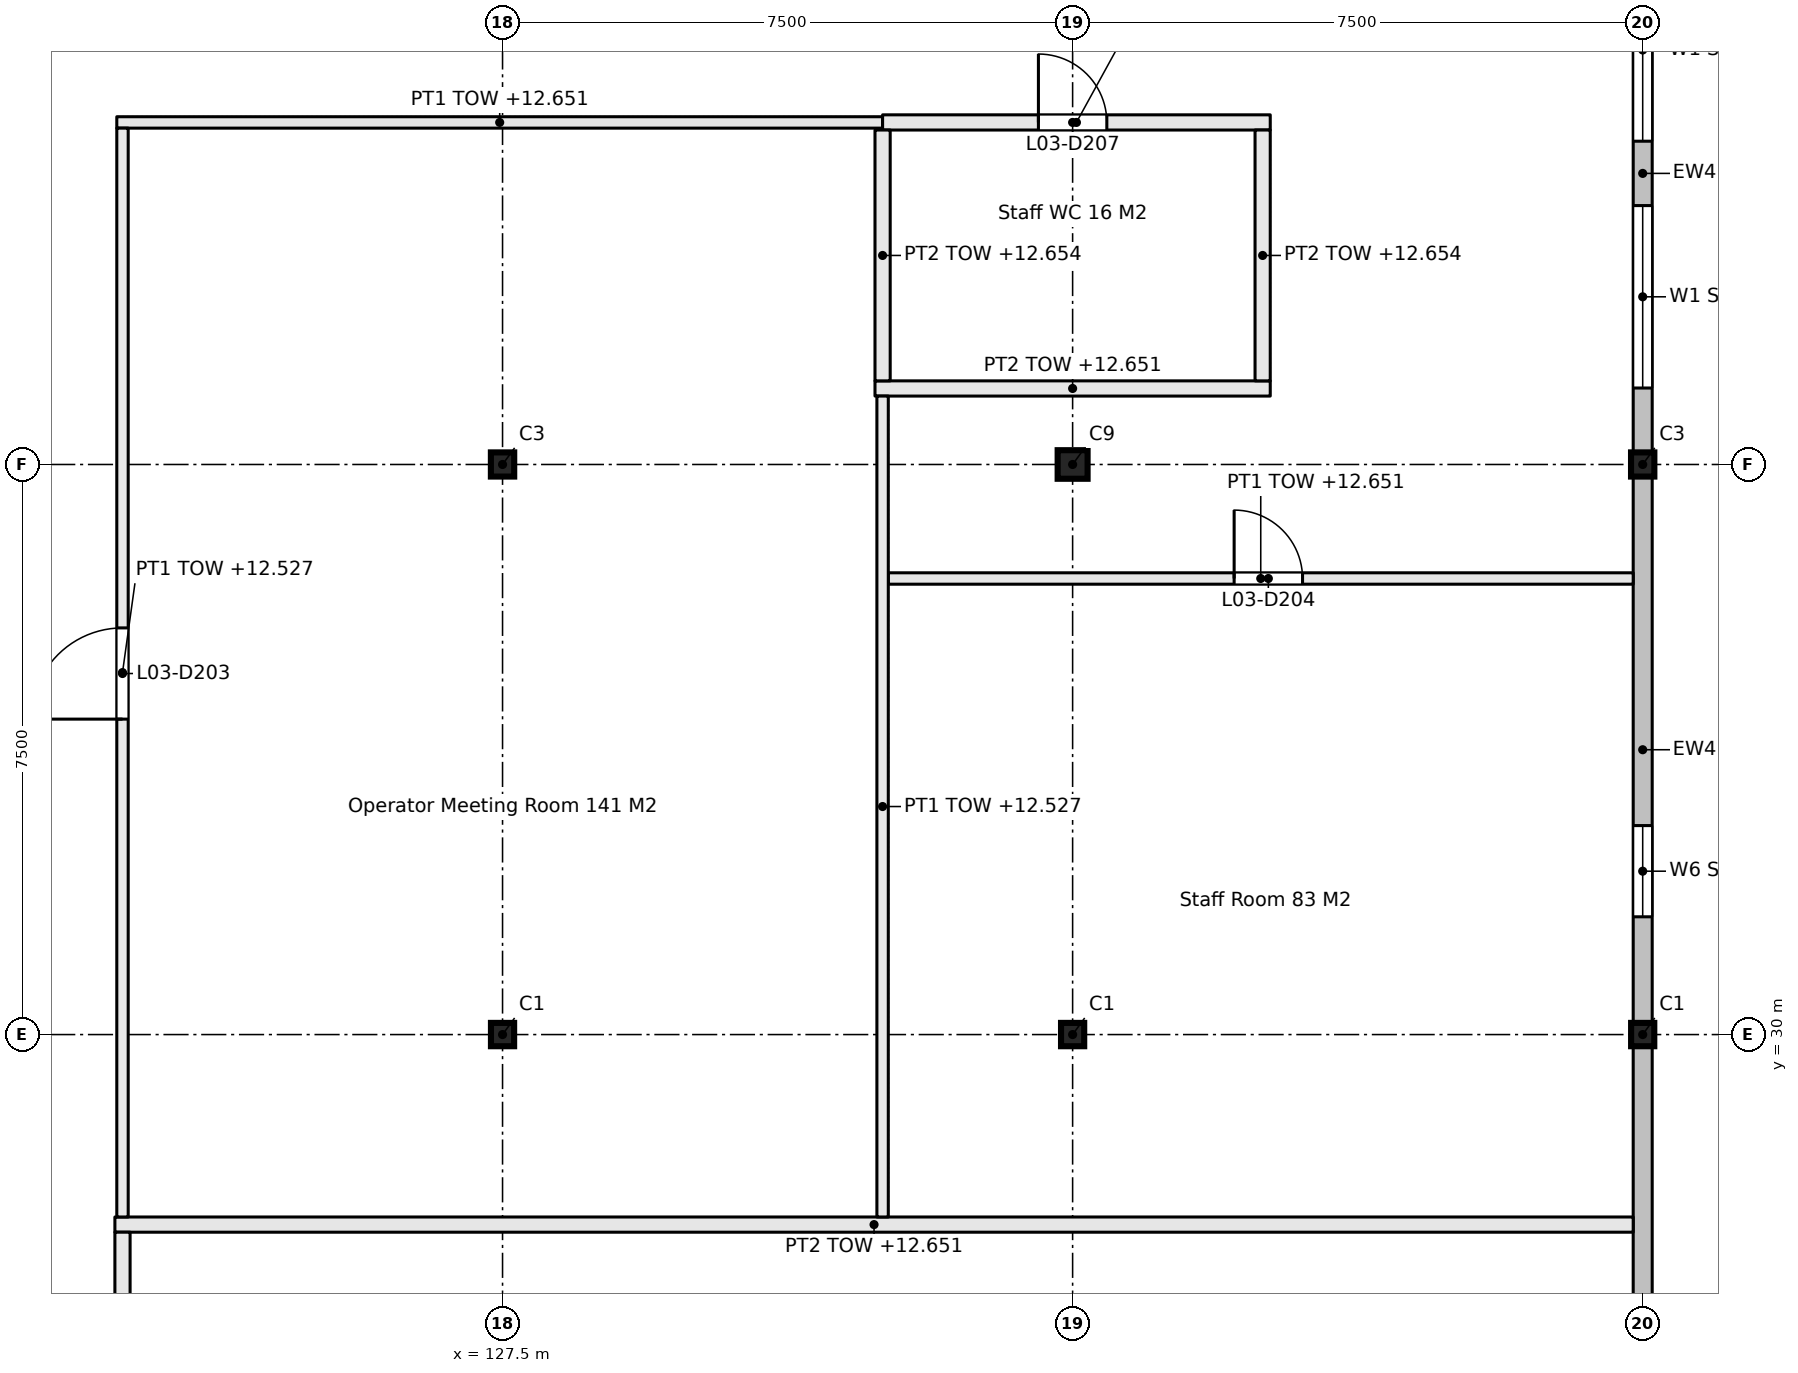
"""IFC4 building model, lengths in metres.
Left out: names, types, materials, properties, quantities, classifications, styles, units other than length and angle.
Written with IfcOpenShell. Run it as: python <this file> out.ifc"""

import sys

from ifc_helpers import new_model, si_unit, direction, frame, frame_2d, origin, origin_2d, place, context, subcontext, project, spatial, rectangle, i_section, extrude, element, fill, save


model = new_model("IFC4")
c1 = context("Model", 3, precision=1e-05, world=origin(), true_north=direction((0.0, 1.0)))
c2 = subcontext(c1, "Body", "Model", "MODEL_VIEW")
j1 = project(units=[si_unit("LENGTHUNIT", "METRE"), si_unit("PLANEANGLEUNIT", "RADIAN")], contexts=[c1])
p1 = place(None, origin())
s1 = spatial("IfcSite", under=j1, at=p1, CompositionType="ELEMENT")
p2 = place(p1, origin())
s2 = spatial("IfcBuilding", under=s1, at=p2, CompositionType="ELEMENT")
p3 = place(p2, frame((0.0, 0.0, 9.9)))
s3 = spatial("IfcBuildingStorey", under=s2, at=p3, CompositionType="ELEMENT", Elevation=9.9)
p4 = place(p3, frame((127.5, 30.0, 0.0), z_axis=(0.0, 0.0, 1.0), x_axis=(1.0, 0.0, 0.0)))
e1 = element("IfcColumn", 1, at=p4, inside=s3, PredefinedType="COLUMN", context=c2, shape_type="SweptSolid", body=[
    extrude(i_section(OverallWidth=0.305, OverallDepth=0.307, WebThickness=0.01, FlangeThickness=0.015, FilletRadius=0.015, at=origin_2d()), origin(), (0.0, 0.0, 1.0), 3.3),
])
p5 = place(p3, frame((127.5, 37.5, 0.0), z_axis=(0.0, 0.0, 1.0), x_axis=(1.0, 0.0, 0.0)))
e2 = element("IfcColumn", 2, at=p5, inside=s3, PredefinedType="COLUMN", context=c2, shape_type="SweptSolid", body=[
    extrude(i_section(OverallWidth=0.307, OverallDepth=0.318, WebThickness=0.013, FlangeThickness=0.021, FilletRadius=0.015, at=origin_2d()), origin(), (0.0, 0.0, 1.0), 3.3),
])
p6 = place(p3, frame((135.0, 30.0, 0.0), z_axis=(0.0, 0.0, 1.0), x_axis=(1.0, 0.0, 0.0)))
e3 = element("IfcColumn", 3, at=p6, inside=s3, PredefinedType="COLUMN", context=c2, shape_type="SweptSolid", body=[
    extrude(i_section(OverallWidth=0.305, OverallDepth=0.307, WebThickness=0.01, FlangeThickness=0.015, FilletRadius=0.015, at=origin_2d()), origin(), (0.0, 0.0, 1.0), 3.3),
])
p7 = place(p3, frame((135.0, 37.5, 0.0), z_axis=(0.0, 0.0, 1.0), x_axis=(1.0, 0.0, 0.0)))
e4 = element("IfcColumn", 4, at=p7, inside=s3, PredefinedType="COLUMN", context=c2, shape_type="SweptSolid", body=[
    extrude(i_section(OverallWidth=0.394, OverallDepth=0.376, WebThickness=0.017, FlangeThickness=0.028, FilletRadius=0.015, at=origin_2d()), origin(), (0.0, 0.0, 1.0), 3.3),
])
p8 = place(p3, frame((142.5, 30.0, 0.0), z_axis=(0.0, 0.0, 1.0), x_axis=(1.0, 0.0, 0.0)))
e5 = element("IfcColumn", 5, at=p8, inside=s3, PredefinedType="COLUMN", context=c2, shape_type="SweptSolid", body=[
    extrude(i_section(OverallWidth=0.305, OverallDepth=0.307, WebThickness=0.01, FlangeThickness=0.015, FilletRadius=0.015, at=origin_2d()), origin(), (0.0, 0.0, 1.0), 3.3),
])
p9 = place(p3, frame((142.5, 37.5, 0.0), z_axis=(0.0, 0.0, 1.0), x_axis=(1.0, 0.0, 0.0)))
e6 = element("IfcColumn", 6, at=p9, inside=s3, PredefinedType="COLUMN", context=c2, shape_type="SweptSolid", body=[
    extrude(i_section(OverallWidth=0.307, OverallDepth=0.318, WebThickness=0.013, FlangeThickness=0.021, FilletRadius=0.015, at=origin_2d()), origin(), (0.0, 0.0, 1.0), 3.3),
])
p10 = place(p3, frame((122.4, 27.5, 0.0), z_axis=(0.0, 0.0, 1.0), x_axis=(1.0, 0.0, 0.0)))
e7 = element("IfcWall", 7, at=p10, inside=s3, PredefinedType="PARTITIONING", context=c2, shape_type="SweptSolid", body=[
    extrude(rectangle(XDim=19.975, YDim=0.2, at=frame_2d((9.988, 0.0))), origin(), (0.0, 0.0, 1.0), 2.751),
])
p11 = place(p3, frame((132.575, 36.0, 0.0), z_axis=(0.0, 0.0, 1.0), x_axis=(1.0, 0.0, 0.0)))
e8 = element("IfcWall", 8, at=p11, inside=s3, PredefinedType="PARTITIONING", context=c2, shape_type="SweptSolid", body=[
    extrude(rectangle(XDim=9.8, YDim=0.15, at=frame_2d((4.9, 0.0))), origin(), (0.0, 0.0, 1.0), 2.751),
])
p12 = place(p11, frame((4.55, 0.0, 0.0)))
e9 = element("IfcOpeningElement", 9, at=p12, cuts=e8, PredefinedType="OPENING", context=c2, shape_type="SweptSolid", body=[
    extrude(rectangle(XDim=0.9, YDim=2.1, at=frame_2d((0.45, 1.05))), frame((0.0, 0.085, 0.0), z_axis=(0.0, -1.0, 0.0), x_axis=(1.0, 0.0, 0.0)), (0.0, 0.0, 1.0), 0.17),
])
p13 = place(p3, frame((132.4, 38.5, 0.0), z_axis=(0.0, 0.0, 1.0), x_axis=(1.0, 0.0, 0.0)))
e10 = element("IfcWall", 10, at=p13, inside=s3, PredefinedType="PARTITIONING", context=c2, shape_type="SweptSolid", body=[
    extrude(rectangle(XDim=5.2, YDim=0.2, at=frame_2d((2.6, 0.0))), origin(), (0.0, 0.0, 1.0), 2.751),
])
p14 = place(p3, frame((122.425, 42.0, 0.0), z_axis=(0.0, 0.0, 1.0), x_axis=(1.0, 0.0, 0.0)))
e11 = element("IfcWall", 11, at=p14, inside=s3, PredefinedType="PARTITIONING", context=c2, shape_type="SweptSolid", body=[
    extrude(rectangle(XDim=10.075, YDim=0.15, at=frame_2d((5.038, 0.0))), origin(), (0.0, 0.0, 1.0), 2.751),
])
p15 = place(p3, frame((132.5, 42.0, 0.0), z_axis=(0.0, 0.0, 1.0), x_axis=(1.0, 0.0, 0.0)))
e12 = element("IfcWall", 12, at=p15, inside=s3, PredefinedType="PARTITIONING", context=c2, shape_type="SweptSolid", body=[
    extrude(rectangle(XDim=5.1, YDim=0.2, at=frame_2d((2.55, 0.0))), origin(), (0.0, 0.0, 1.0), 2.751),
])
p16 = place(p15, frame((2.05, 0.0, 0.0)))
e13 = element("IfcOpeningElement", 13, at=p16, cuts=e12, PredefinedType="OPENING", context=c2, shape_type="SweptSolid", body=[
    extrude(rectangle(XDim=0.9, YDim=2.1, at=frame_2d((0.45, 1.05))), frame((0.0, 0.11, 0.0), z_axis=(0.0, -1.0, 0.0), x_axis=(1.0, 0.0, 0.0)), (0.0, 0.0, 1.0), 0.22),
])
p17 = place(p3, frame((122.5, 7.625, 0.0), z_axis=(0.0, 0.0, 1.0), x_axis=(0.0, 1.0, 0.0)))
e14 = element("IfcWall", 14, at=p17, inside=s3, PredefinedType="PARTITIONING", context=c2, shape_type="SweptSolid", body=[
    extrude(rectangle(XDim=19.775, YDim=0.2, at=frame_2d((9.887, 0.0))), origin(), (0.0, 0.0, 1.0), 2.627),
])
p18 = place(p17, frame((9.175, 0.0, 0.0)))
e15 = element("IfcOpeningElement", 15, at=p18, cuts=e14, PredefinedType="OPENING", context=c2, shape_type="SweptSolid", body=[
    extrude(rectangle(XDim=1.2, YDim=2.1, at=frame_2d((0.6, 1.05))), frame((0.0, 0.11, 0.0), z_axis=(0.0, -1.0, 0.0), x_axis=(1.0, 0.0, 0.0)), (0.0, 0.0, 1.0), 0.22),
])
p19 = place(p3, frame((122.5, 27.6, 0.0), z_axis=(0.0, 0.0, 1.0), x_axis=(0.0, 1.0, 0.0)))
e16 = element("IfcWall", 16, at=p19, inside=s3, PredefinedType="PARTITIONING", context=c2, shape_type="SweptSolid", body=[
    extrude(rectangle(XDim=14.325, YDim=0.15, at=frame_2d((7.163, 0.0))), origin(), (0.0, 0.0, 1.0), 2.627),
])
p20 = place(p19, frame((6.55, 0.0, 0.0)))
e17 = element("IfcOpeningElement", 17, at=p20, cuts=e16, PredefinedType="OPENING", context=c2, shape_type="SweptSolid", body=[
    extrude(rectangle(XDim=1.2, YDim=2.1, at=frame_2d((0.6, 1.05))), frame((0.0, 0.085, 0.0), z_axis=(0.0, -1.0, 0.0), x_axis=(1.0, 0.0, 0.0)), (0.0, 0.0, 1.0), 0.17),
])
p21 = place(p3, frame((132.5, 27.6, 0.0), z_axis=(0.0, 0.0, 1.0), x_axis=(0.0, 1.0, 0.0)))
e18 = element("IfcWall", 18, at=p21, inside=s3, PredefinedType="PARTITIONING", context=c2, shape_type="SweptSolid", body=[
    extrude(rectangle(XDim=10.8, YDim=0.15, at=frame_2d((5.4, 0.0))), origin(), (0.0, 0.0, 1.0), 2.627),
])
for number, where, z_axis, x_axis in (
    (19, (132.5, 38.6, 0.0), (0.0, 0.0, 1.0), (0.0, 1.0, 0.0)),
    (20, (137.5, 38.6, 0.0), (0.0, 0.0, 1.0), (0.0, 1.0, 0.0)),
):
    element("IfcWall", number, at=place(p3, frame(where, z_axis=z_axis, x_axis=x_axis)), inside=s3, PredefinedType="PARTITIONING", context=c2, shape_type="SweptSolid", body=[
        extrude(rectangle(XDim=3.3, YDim=0.2, at=frame_2d((1.65, 0.0))), origin(), (0.0, 0.0, 1.0), 2.754),
    ])
p22 = place(p3, frame((142.5, 22.654, 0.0), z_axis=(0.0, 0.0, 1.0), x_axis=(0.0, 1.0, 0.0)))
e21 = element("IfcWall", 21, at=p22, inside=s3, PredefinedType="SOLIDWALL", context=c2, shape_type="SweptSolid", body=[
    extrude(rectangle(XDim=7.193, YDim=0.25, at=frame_2d((3.596, 0.0))), origin(), (0.0, 0.0, 1.0), 2.751),
])
p23 = place(p22, frame((0.498, 0.0, 0.9)))
e22 = element("IfcOpeningElement", 22, at=p23, cuts=e21, PredefinedType="OPENING", context=c2, shape_type="SweptSolid", body=[
    extrude(rectangle(XDim=3.0, YDim=1.5, at=frame_2d((1.5, 0.75))), frame((0.0, 0.135, 0.0), z_axis=(0.0, -1.0, 0.0), x_axis=(1.0, 0.0, 0.0)), (0.0, 0.0, 1.0), 0.27),
])
p24 = place(p3, frame((142.5, 30.154, 0.0), z_axis=(0.0, 0.0, 1.0), x_axis=(0.0, 1.0, 0.0)))
e23 = element("IfcWall", 23, at=p24, inside=s3, PredefinedType="SOLIDWALL", context=c2, shape_type="SweptSolid", body=[
    extrude(rectangle(XDim=7.188, YDim=0.25, at=frame_2d((3.594, 0.0))), origin(), (0.0, 0.0, 1.0), 2.751),
])
p25 = place(p24, frame((1.396, 0.0, 0.9)))
e24 = element("IfcOpeningElement", 24, at=p25, cuts=e23, PredefinedType="OPENING", context=c2, shape_type="SweptSolid", body=[
    extrude(rectangle(XDim=1.2, YDim=1.2, at=frame_2d((0.6, 0.6))), frame((0.0, 0.135, 0.0), z_axis=(0.0, -1.0, 0.0), x_axis=(1.0, 0.0, 0.0)), (0.0, 0.0, 1.0), 0.27),
])
p26 = place(p3, frame((142.5, 37.659, 0.0), z_axis=(0.0, 0.0, 1.0), x_axis=(0.0, 1.0, 0.0)))
e25 = element("IfcWall", 25, at=p26, inside=s3, PredefinedType="SOLIDWALL", context=c2, shape_type="SweptSolid", body=[
    extrude(rectangle(XDim=7.341, YDim=0.25, at=frame_2d((3.67, 0.0))), origin(), (0.0, 0.0, 1.0), 2.751),
])
p27 = place(p26, frame((0.847, 0.0, 0.9)))
e26 = element("IfcOpeningElement", 26, at=p27, cuts=e25, PredefinedType="OPENING", context=c2, shape_type="SweptSolid", body=[
    extrude(rectangle(XDim=2.4, YDim=1.5, at=frame_2d((1.2, 0.75))), frame((0.0, 0.135, 0.0), z_axis=(0.0, -1.0, 0.0), x_axis=(1.0, 0.0, 0.0)), (0.0, 0.0, 1.0), 0.27),
])
p28 = place(p26, frame((4.094, 0.0, 0.9)))
e27 = element("IfcOpeningElement", 27, at=p28, cuts=e25, PredefinedType="OPENING", context=c2, shape_type="SweptSolid", body=[
    extrude(rectangle(XDim=2.4, YDim=1.5, at=frame_2d((1.2, 0.75))), frame((0.0, 0.135, 0.0), z_axis=(0.0, -1.0, 0.0), x_axis=(1.0, 0.0, 0.0)), (0.0, 0.0, 1.0), 0.27),
])
p29 = place(p20, origin())
e28 = element("IfcDoor", 28, at=p29, inside=s3, OperationType="DOUBLE_DOOR_SINGLE_SWING", PredefinedType="DOOR", context=c2, shape_type="SweptSolid", body=[
    extrude(rectangle(XDim=1.2, YDim=2.1, at=frame_2d((0.6, 1.05))), frame((0.0, 0.025, 0.0), z_axis=(0.0, -1.0, 0.0), x_axis=(1.0, 0.0, 0.0)), (0.0, 0.0, 1.0), 0.05),
])
fill(e17, e28)
p30 = place(p12, origin())
e29 = element("IfcDoor", 29, at=p30, inside=s3, OperationType="SINGLE_SWING_RIGHT", PredefinedType="DOOR", context=c2, shape_type="SweptSolid", body=[
    extrude(rectangle(XDim=0.9, YDim=2.1, at=frame_2d((0.45, 1.05))), frame((0.0, 0.025, 0.0), z_axis=(0.0, -1.0, 0.0), x_axis=(1.0, 0.0, 0.0)), (0.0, 0.0, 1.0), 0.05),
])
fill(e9, e29)
p31 = place(p16, origin())
e30 = element("IfcDoor", 30, at=p31, inside=s3, OperationType="SINGLE_SWING_LEFT", PredefinedType="DOOR", context=c2, shape_type="SweptSolid", body=[
    extrude(rectangle(XDim=0.9, YDim=2.1, at=frame_2d((0.45, 1.05))), frame((0.0, 0.025, 0.0), z_axis=(0.0, -1.0, 0.0), x_axis=(1.0, 0.0, 0.0)), (0.0, 0.0, 1.0), 0.05),
])
fill(e13, e30)
p32 = place(p25, origin())
e31 = element("IfcWindow", 31, at=p32, inside=s3, PartitioningType="SINGLE_PANEL", PredefinedType="WINDOW", context=c2, shape_type="SweptSolid", body=[
    extrude(rectangle(XDim=1.2, YDim=1.2, at=frame_2d((0.6, 0.6))), frame((0.0, 0.03, 0.0), z_axis=(0.0, -1.0, 0.0), x_axis=(1.0, 0.0, 0.0)), (0.0, 0.0, 1.0), 0.06),
])
fill(e24, e31)
p33 = place(p27, origin())
e32 = element("IfcWindow", 32, at=p33, inside=s3, PartitioningType="DOUBLE_PANEL_VERTICAL", PredefinedType="WINDOW", context=c2, shape_type="SweptSolid", body=[
    extrude(rectangle(XDim=2.4, YDim=1.5, at=frame_2d((1.2, 0.75))), frame((0.0, 0.03, 0.0), z_axis=(0.0, -1.0, 0.0), x_axis=(1.0, 0.0, 0.0)), (0.0, 0.0, 1.0), 0.06),
])
fill(e26, e32)
p34 = place(p28, origin())
e33 = element("IfcWindow", 33, at=p34, inside=s3, PartitioningType="DOUBLE_PANEL_VERTICAL", PredefinedType="WINDOW", context=c2, shape_type="SweptSolid", body=[
    extrude(rectangle(XDim=2.4, YDim=1.5, at=frame_2d((1.2, 0.75))), frame((0.0, 0.03, 0.0), z_axis=(0.0, -1.0, 0.0), x_axis=(1.0, 0.0, 0.0)), (0.0, 0.0, 1.0), 0.06),
])
fill(e27, e33)
save(model, sys.argv[1])
